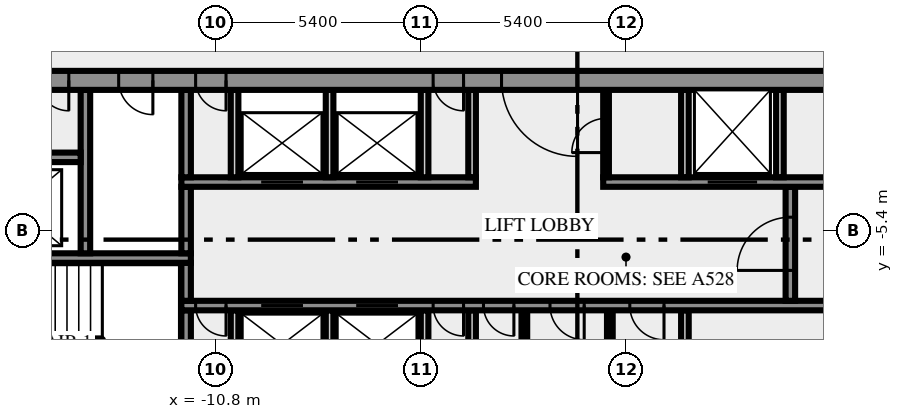
"""IFC4 building model, lengths in metres.
Left out: names, types, materials, properties, quantities, classifications, styles, units other than length and angle.
Written with IfcOpenShell. Run it as: python <this file> out.ifc"""

import sys

from ifc_helpers import new_model, si_unit, direction, frame, frame_2d, origin, place, context, subcontext, project, spatial, rectangle, extrude, element, fill, save


model = new_model("IFC4")
c1 = context("Model", 3, precision=1e-05, world=origin(), true_north=direction((0.0, 1.0)))
c2 = subcontext(c1, "Body", "Model", "MODEL_VIEW")
j1 = project(units=[si_unit("LENGTHUNIT", "METRE"), si_unit("PLANEANGLEUNIT", "RADIAN")], contexts=[c1])
p1 = place(None, origin())
s1 = spatial("IfcSite", under=j1, at=p1, CompositionType="ELEMENT")
p2 = place(p1, origin())
s2 = spatial("IfcBuilding", under=s1, at=p2, CompositionType="ELEMENT")
p3 = place(p2, frame((0.0, 0.0, 351.0)))
s3 = spatial("IfcBuildingStorey", under=s2, at=p3, CompositionType="ELEMENT", Elevation=351.0)
p4 = place(p3, frame((-11.575, -10.5, 0.0), z_axis=(0.0, 0.0, 1.0), x_axis=(0.0, 1.0, 0.0)))
e1 = element("IfcWall", 1, at=p4, inside=s3, PredefinedType="SHEAR", context=c2, shape_type="SweptSolid", body=[
    extrude(rectangle(XDim=3.0, YDim=0.25, at=frame_2d((1.5, 0.0))), origin(), (0.0, 0.0, 1.0), 3.2),
])
for number, where, z_axis, x_axis in (
    (2, (-10.3, -10.5, 0.0), (0.0, 0.0, 1.0), (0.0, 1.0, 0.0)),
    (3, (-7.8, -10.5, 0.0), (0.0, 0.0, 1.0), (0.0, 1.0, 0.0)),
    (4, (-5.3, -10.5, 0.0), (0.0, 0.0, 1.0), (0.0, 1.0, 0.0)),
    (5, (-4.05, -10.5, 0.0), (0.0, 0.0, 1.0), (0.0, 1.0, 0.0)),
):
    element("IfcWall", number, at=place(p3, frame(where, z_axis=z_axis, x_axis=x_axis)), inside=s3, PredefinedType="SOLIDWALL", context=c2, shape_type="SweptSolid", body=[
        extrude(rectangle(XDim=3.0, YDim=0.2, at=frame_2d((1.5, 0.0))), origin(), (0.0, 0.0, 1.0), 3.2),
    ])
for number, where, z_axis, x_axis in (
    (6, (-2.675, -10.5, 0.0), (0.0, 0.0, 1.0), (0.0, 1.0, 0.0)),
    (7, (-0.425, -10.5, 0.0), (0.0, 0.0, 1.0), (0.0, 1.0, 0.0)),
):
    element("IfcWall", number, at=place(p3, frame(where, z_axis=z_axis, x_axis=x_axis)), inside=s3, PredefinedType="PARTITIONING", context=c2, shape_type="SweptSolid", body=[
        extrude(rectangle(XDim=3.0, YDim=0.15, at=frame_2d((1.5, 0.0))), origin(), (0.0, 0.0, 1.0), 3.2),
    ])
p5 = place(p3, frame((1.55, -10.5, 0.0), z_axis=(0.0, 0.0, 1.0), x_axis=(0.0, 1.0, 0.0)))
e8 = element("IfcWall", 8, at=p5, inside=s3, PredefinedType="SOLIDWALL", context=c2, shape_type="SweptSolid", body=[
    extrude(rectangle(XDim=3.0, YDim=0.2, at=frame_2d((1.5, 0.0))), origin(), (0.0, 0.0, 1.0), 3.2),
])
p6 = place(p3, frame((11.7, -7.375, 0.0), z_axis=(0.0, 0.0, 1.0), x_axis=(-1.0, 0.0, 0.0)))
e9 = element("IfcWall", 9, at=p6, inside=s3, PredefinedType="SHEAR", context=c2, shape_type="SweptSolid", body=[
    extrude(rectangle(XDim=23.4, YDim=0.25, at=frame_2d((11.7, 0.0))), origin(), (0.0, 0.0, 1.0), 3.2),
])
p7 = place(p6, frame((22.225, 0.0, 0.0)))
e10 = element("IfcOpeningElement", 10, at=p7, cuts=e9, PredefinedType="OPENING", context=c2, shape_type="SweptSolid", body=[
    extrude(rectangle(XDim=0.8, YDim=2.1, at=frame_2d((0.4, 1.05))), frame((0.0, 0.135, 0.0), z_axis=(0.0, -1.0, 0.0), x_axis=(1.0, 0.0, 0.0)), (0.0, 0.0, 1.0), 0.27),
])
p8 = place(p6, frame((20.2, 0.0, 0.0)))
e11 = element("IfcOpeningElement", 11, at=p8, cuts=e9, PredefinedType="OPENING", context=c2, shape_type="SweptSolid", body=[
    extrude(rectangle(XDim=1.1, YDim=2.1, at=frame_2d((0.55, 1.05))), frame((0.0, 0.135, 0.0), z_axis=(0.0, -1.0, 0.0), x_axis=(1.0, 0.0, 0.0)), (0.0, 0.0, 1.0), 0.27),
])
p9 = place(p6, frame((17.7, 0.0, 0.0)))
e12 = element("IfcOpeningElement", 12, at=p9, cuts=e9, PredefinedType="OPENING", context=c2, shape_type="SweptSolid", body=[
    extrude(rectangle(XDim=1.1, YDim=2.1, at=frame_2d((0.55, 1.05))), frame((0.0, 0.135, 0.0), z_axis=(0.0, -1.0, 0.0), x_axis=(1.0, 0.0, 0.0)), (0.0, 0.0, 1.0), 0.27),
])
p10 = place(p6, frame((15.975, 0.0, 0.0)))
e13 = element("IfcOpeningElement", 13, at=p10, cuts=e9, PredefinedType="OPENING", context=c2, shape_type="SweptSolid", body=[
    extrude(rectangle(XDim=0.8, YDim=2.1, at=frame_2d((0.4, 1.05))), frame((0.0, 0.135, 0.0), z_axis=(0.0, -1.0, 0.0), x_axis=(1.0, 0.0, 0.0)), (0.0, 0.0, 1.0), 0.27),
])
p11 = place(p6, frame((14.65, 0.0, 0.0)))
e14 = element("IfcOpeningElement", 14, at=p11, cuts=e9, PredefinedType="OPENING", context=c2, shape_type="SweptSolid", body=[
    extrude(rectangle(XDim=0.8, YDim=2.1, at=frame_2d((0.4, 1.05))), frame((0.0, 0.135, 0.0), z_axis=(0.0, -1.0, 0.0), x_axis=(1.0, 0.0, 0.0)), (0.0, 0.0, 1.0), 0.27),
])
p12 = place(p6, frame((12.8, 0.0, 0.0)))
e15 = element("IfcOpeningElement", 15, at=p12, cuts=e9, PredefinedType="OPENING", context=c2, shape_type="SweptSolid", body=[
    extrude(rectangle(XDim=0.9, YDim=2.1, at=frame_2d((0.45, 1.05))), frame((0.0, 0.135, 0.0), z_axis=(0.0, -1.0, 0.0), x_axis=(1.0, 0.0, 0.0)), (0.0, 0.0, 1.0), 0.27),
])
p13 = place(p6, frame((10.7, 0.0, 0.0)))
e16 = element("IfcOpeningElement", 16, at=p13, cuts=e9, PredefinedType="OPENING", context=c2, shape_type="SweptSolid", body=[
    extrude(rectangle(XDim=0.9, YDim=2.1, at=frame_2d((0.45, 1.05))), frame((0.0, 0.135, 0.0), z_axis=(0.0, -1.0, 0.0), x_axis=(1.0, 0.0, 0.0)), (0.0, 0.0, 1.0), 0.27),
])
p14 = place(p6, frame((4.7, 0.0, 0.0)))
e17 = element("IfcOpeningElement", 17, at=p14, cuts=e9, PredefinedType="OPENING", context=c2, shape_type="SweptSolid", body=[
    extrude(rectangle(XDim=0.9, YDim=2.1, at=frame_2d((0.45, 1.05))), frame((0.0, 0.135, 0.0), z_axis=(0.0, -1.0, 0.0), x_axis=(1.0, 0.0, 0.0)), (0.0, 0.0, 1.0), 0.27),
])
p15 = place(p3, frame((-11.575, -7.25, 0.0), z_axis=(0.0, 0.0, 1.0), x_axis=(0.0, 1.0, 0.0)))
e18 = element("IfcWall", 18, at=p15, inside=s3, PredefinedType="SHEAR", context=c2, shape_type="SweptSolid", body=[
    extrude(rectangle(XDim=1.0, YDim=0.25, at=frame_2d((0.5, 0.0))), origin(), (0.0, 0.0, 1.0), 3.2),
])
p16 = place(p3, frame((4.325, -7.25, 0.0), z_axis=(0.0, 0.0, 1.0), x_axis=(0.0, 1.0, 0.0)))
e19 = element("IfcWall", 19, at=p16, inside=s3, PredefinedType="SHEAR", context=c2, shape_type="SweptSolid", body=[
    extrude(rectangle(XDim=3.0, YDim=0.25, at=frame_2d((1.5, 0.0))), origin(), (0.0, 0.0, 1.0), 3.2),
])
p17 = place(p16, frame((0.8, 0.0, 0.0)))
e20 = element("IfcOpeningElement", 20, at=p17, cuts=e19, PredefinedType="OPENING", context=c2, shape_type="SweptSolid", body=[
    extrude(rectangle(XDim=1.4, YDim=2.1, at=frame_2d((0.7, 1.05))), frame((0.0, 0.135, 0.0), z_axis=(0.0, -1.0, 0.0), x_axis=(1.0, 0.0, 0.0)), (0.0, 0.0, 1.0), 0.27),
])
p18 = place(p3, frame((-11.45, -6.125, 0.0), z_axis=(0.0, 0.0, 1.0), x_axis=(-1.0, 0.0, 0.0)))
e21 = element("IfcWall", 21, at=p18, inside=s3, PredefinedType="SHEAR", context=c2, shape_type="SweptSolid", body=[
    extrude(rectangle(XDim=8.05, YDim=0.25, at=frame_2d((4.025, 0.0))), origin(), (0.0, 0.0, 1.0), 3.2),
])
p19 = place(p18, frame((6.2, 0.0, 0.0)))
e22 = element("IfcOpeningElement", 22, at=p19, cuts=e21, PredefinedType="OPENING", context=c2, shape_type="SweptSolid", body=[
    extrude(rectangle(XDim=1.8, YDim=2.1, at=frame_2d((0.9, 1.05))), frame((0.0, 0.135, 0.0), z_axis=(0.0, -1.0, 0.0), x_axis=(1.0, 0.0, 0.0)), (0.0, 0.0, 1.0), 0.27),
])
p20 = place(p3, frame((-14.225, -6.0, 0.0), z_axis=(0.0, 0.0, 1.0), x_axis=(0.0, 1.0, 0.0)))
e23 = element("IfcWall", 23, at=p20, inside=s3, PredefinedType="SHEAR", context=c2, shape_type="SweptSolid", body=[
    extrude(rectangle(XDim=4.3, YDim=0.25, at=frame_2d((2.15, 0.0))), origin(), (0.0, 0.0, 1.0), 3.2),
])
p21 = place(p3, frame((-11.575, -6.0, 0.0), z_axis=(0.0, 0.0, 1.0), x_axis=(0.0, 1.0, 0.0)))
e24 = element("IfcWall", 24, at=p21, inside=s3, PredefinedType="SHEAR", context=c2, shape_type="SweptSolid", body=[
    extrude(rectangle(XDim=1.75, YDim=0.25, at=frame_2d((0.875, 0.0))), origin(), (0.0, 0.0, 1.0), 3.2),
])
p22 = place(p3, frame((-11.7, -4.125, 0.0), z_axis=(0.0, 0.0, 1.0), x_axis=(1.0, 0.0, 0.0)))
e25 = element("IfcWall", 25, at=p22, inside=s3, PredefinedType="SHEAR", context=c2, shape_type="SweptSolid", body=[
    extrude(rectangle(XDim=7.75, YDim=0.25, at=frame_2d((3.875, 0.0))), origin(), (0.0, 0.0, 1.0), 3.2),
])
p23 = place(p22, frame((2.1, 0.0, 0.0)))
e26 = element("IfcOpeningElement", 26, at=p23, cuts=e25, PredefinedType="OPENING", context=c2, shape_type="SweptSolid", body=[
    extrude(rectangle(XDim=1.1, YDim=2.1, at=frame_2d((0.55, 1.05))), frame((0.0, 0.135, 0.0), z_axis=(0.0, -1.0, 0.0), x_axis=(1.0, 0.0, 0.0)), (0.0, 0.0, 1.0), 0.27),
])
p24 = place(p22, frame((4.6, 0.0, 0.0)))
e27 = element("IfcOpeningElement", 27, at=p24, cuts=e25, PredefinedType="OPENING", context=c2, shape_type="SweptSolid", body=[
    extrude(rectangle(XDim=1.1, YDim=2.1, at=frame_2d((0.55, 1.05))), frame((0.0, 0.135, 0.0), z_axis=(0.0, -1.0, 0.0), x_axis=(1.0, 0.0, 0.0)), (0.0, 0.0, 1.0), 0.27),
])
p25 = place(p3, frame((-0.6, -4.125, 0.0), z_axis=(0.0, 0.0, 1.0), x_axis=(1.0, 0.0, 0.0)))
e28 = element("IfcWall", 28, at=p25, inside=s3, PredefinedType="SHEAR", context=c2, shape_type="SweptSolid", body=[
    extrude(rectangle(XDim=12.3, YDim=0.25, at=frame_2d((6.15, 0.0))), origin(), (0.0, 0.0, 1.0), 3.2),
])
p26 = place(p25, frame((2.75, 0.0, 0.0)))
e29 = element("IfcOpeningElement", 29, at=p26, cuts=e28, PredefinedType="OPENING", context=c2, shape_type="SweptSolid", body=[
    extrude(rectangle(XDim=1.3, YDim=2.1, at=frame_2d((0.65, 1.05))), frame((0.0, 0.135, 0.0), z_axis=(0.0, -1.0, 0.0), x_axis=(1.0, 0.0, 0.0)), (0.0, 0.0, 1.0), 0.27),
])
p27 = place(p3, frame((-11.575, -4.0, 0.0), z_axis=(0.0, 0.0, 1.0), x_axis=(0.0, 1.0, 0.0)))
e30 = element("IfcWall", 30, at=p27, inside=s3, PredefinedType="SHEAR", context=c2, shape_type="SweptSolid", body=[
    extrude(rectangle(XDim=2.3, YDim=0.25, at=frame_2d((1.15, 0.0))), origin(), (0.0, 0.0, 1.0), 3.2),
])
for number, where, z_axis, x_axis in (
    (31, (-10.3, -4.0, 0.0), (0.0, 0.0, 1.0), (0.0, 1.0, 0.0)),
    (32, (-7.8, -4.0, 0.0), (0.0, 0.0, 1.0), (0.0, 1.0, 0.0)),
    (33, (-5.3, -4.0, 0.0), (0.0, 0.0, 1.0), (0.0, 1.0, 0.0)),
    (34, (-4.05, -4.0, 0.0), (0.0, 0.0, 1.0), (0.0, 1.0, 0.0)),
):
    element("IfcWall", number, at=place(p3, frame(where, z_axis=z_axis, x_axis=x_axis)), inside=s3, PredefinedType="SOLIDWALL", context=c2, shape_type="SweptSolid", body=[
        extrude(rectangle(XDim=2.3, YDim=0.2, at=frame_2d((1.15, 0.0))), origin(), (0.0, 0.0, 1.0), 3.2),
    ])
p28 = place(p3, frame((-0.525, -4.0, 0.0), z_axis=(0.0, 0.0, 1.0), x_axis=(0.0, 1.0, 0.0)))
e35 = element("IfcWall", 35, at=p28, inside=s3, PredefinedType="PARTITIONING", context=c2, shape_type="SweptSolid", body=[
    extrude(rectangle(XDim=2.3, YDim=0.15, at=frame_2d((1.15, 0.0))), origin(), (0.0, 0.0, 1.0), 3.2),
])
p29 = place(p28, frame((0.65, 0.0, 0.0)))
e36 = element("IfcOpeningElement", 36, at=p29, cuts=e35, PredefinedType="OPENING", context=c2, shape_type="SweptSolid", body=[
    extrude(rectangle(XDim=0.9, YDim=2.1, at=frame_2d((0.45, 1.05))), frame((0.0, 0.085, 0.0), z_axis=(0.0, -1.0, 0.0), x_axis=(1.0, 0.0, 0.0)), (0.0, 0.0, 1.0), 0.17),
])
for number, where, z_axis, x_axis in (
    (37, (1.55, -4.0, 0.0), (0.0, 0.0, 1.0), (0.0, 1.0, 0.0)),
    (38, (4.05, -4.0, 0.0), (0.0, 0.0, 1.0), (0.0, 1.0, 0.0)),
):
    element("IfcWall", number, at=place(p3, frame(where, z_axis=z_axis, x_axis=x_axis)), inside=s3, PredefinedType="SOLIDWALL", context=c2, shape_type="SweptSolid", body=[
        extrude(rectangle(XDim=2.3, YDim=0.2, at=frame_2d((1.15, 0.0))), origin(), (0.0, 0.0, 1.0), 3.2),
    ])
p30 = place(p3, frame((-17.35, -3.475, 0.0), z_axis=(0.0, 0.0, 1.0), x_axis=(1.0, 0.0, 0.0)))
e39 = element("IfcWall", 39, at=p30, inside=s3, PredefinedType="SHEAR", context=c2, shape_type="SweptSolid", body=[
    extrude(rectangle(XDim=3.0, YDim=0.25, at=frame_2d((1.5, 0.0))), origin(), (0.0, 0.0, 1.0), 3.2),
])
p31 = place(p3, frame((20.49, -1.45, 0.0), z_axis=(0.0, 0.0, 1.0), x_axis=(-1.0, 0.0, 0.0)))
e40 = element("IfcWall", 40, at=p31, inside=s3, PredefinedType="SHEAR", context=c2, shape_type="SweptSolid", body=[
    extrude(rectangle(XDim=40.98, YDim=0.5, at=frame_2d((20.49, 0.0))), origin(), (0.0, 0.0, 1.0), 3.2),
])
p32 = place(p31, frame((38.14, 0.0, 0.0)))
e41 = element("IfcOpeningElement", 41, at=p32, cuts=e40, PredefinedType="OPENING", context=c2, shape_type="SweptSolid", body=[
    extrude(rectangle(XDim=1.8, YDim=2.1, at=frame_2d((0.9, 1.05))), frame((0.0, 0.26, 0.0), z_axis=(0.0, -1.0, 0.0), x_axis=(1.0, 0.0, 0.0)), (0.0, 0.0, 1.0), 0.52),
])
p33 = place(p31, frame((36.728, 0.0, 0.0)))
e42 = element("IfcOpeningElement", 42, at=p33, cuts=e40, PredefinedType="OPENING", context=c2, shape_type="SweptSolid", body=[
    extrude(rectangle(XDim=0.8, YDim=2.1, at=frame_2d((0.4, 1.05))), frame((0.0, 0.26, 0.0), z_axis=(0.0, -1.0, 0.0), x_axis=(1.0, 0.0, 0.0)), (0.0, 0.0, 1.0), 0.52),
])
p34 = place(p31, frame((35.153, 0.0, 0.0)))
e43 = element("IfcOpeningElement", 43, at=p34, cuts=e40, PredefinedType="OPENING", context=c2, shape_type="SweptSolid", body=[
    extrude(rectangle(XDim=0.8, YDim=2.1, at=frame_2d((0.4, 1.05))), frame((0.0, 0.26, 0.0), z_axis=(0.0, -1.0, 0.0), x_axis=(1.0, 0.0, 0.0)), (0.0, 0.0, 1.0), 0.52),
])
p35 = place(p31, frame((32.94, 0.0, 0.0)))
e44 = element("IfcOpeningElement", 44, at=p35, cuts=e40, PredefinedType="OPENING", context=c2, shape_type="SweptSolid", body=[
    extrude(rectangle(XDim=0.9, YDim=2.1, at=frame_2d((0.45, 1.05))), frame((0.0, 0.26, 0.0), z_axis=(0.0, -1.0, 0.0), x_axis=(1.0, 0.0, 0.0)), (0.0, 0.0, 1.0), 0.52),
])
p36 = place(p31, frame((31.015, 0.0, 0.0)))
e45 = element("IfcOpeningElement", 45, at=p36, cuts=e40, PredefinedType="OPENING", context=c2, shape_type="SweptSolid", body=[
    extrude(rectangle(XDim=0.8, YDim=2.1, at=frame_2d((0.4, 1.05))), frame((0.0, 0.26, 0.0), z_axis=(0.0, -1.0, 0.0), x_axis=(1.0, 0.0, 0.0)), (0.0, 0.0, 1.0), 0.52),
])
p37 = place(p31, frame((24.765, 0.0, 0.0)))
e46 = element("IfcOpeningElement", 46, at=p37, cuts=e40, PredefinedType="OPENING", context=c2, shape_type="SweptSolid", body=[
    extrude(rectangle(XDim=0.8, YDim=2.1, at=frame_2d((0.4, 1.05))), frame((0.0, 0.26, 0.0), z_axis=(0.0, -1.0, 0.0), x_axis=(1.0, 0.0, 0.0)), (0.0, 0.0, 1.0), 0.52),
])
p38 = place(p31, frame((21.765, 0.0, 0.0)))
e47 = element("IfcOpeningElement", 47, at=p38, cuts=e40, PredefinedType="OPENING", context=c2, shape_type="SweptSolid", body=[
    extrude(rectangle(XDim=2.0, YDim=2.1, at=frame_2d((1.0, 1.05))), frame((0.0, 0.26, 0.0), z_axis=(0.0, -1.0, 0.0), x_axis=(1.0, 0.0, 0.0)), (0.0, 0.0, 1.0), 0.52),
])
p39 = place(p31, frame((14.002, 0.0, 0.0)))
e48 = element("IfcOpeningElement", 48, at=p39, cuts=e40, PredefinedType="OPENING", context=c2, shape_type="SweptSolid", body=[
    extrude(rectangle(XDim=0.9, YDim=2.1, at=frame_2d((0.45, 1.05))), frame((0.0, 0.26, 0.0), z_axis=(0.0, -1.0, 0.0), x_axis=(1.0, 0.0, 0.0)), (0.0, 0.0, 1.0), 0.52),
])
p40 = place(p31, frame((10.278, 0.0, 0.0)))
e49 = element("IfcOpeningElement", 49, at=p40, cuts=e40, PredefinedType="OPENING", context=c2, shape_type="SweptSolid", body=[
    extrude(rectangle(XDim=0.9, YDim=2.1, at=frame_2d((0.45, 1.05))), frame((0.0, 0.26, 0.0), z_axis=(0.0, -1.0, 0.0), x_axis=(1.0, 0.0, 0.0)), (0.0, 0.0, 1.0), 0.52),
])
p41 = place(p31, frame((7.14, 0.0, 0.0)))
e50 = element("IfcOpeningElement", 50, at=p41, cuts=e40, PredefinedType="OPENING", context=c2, shape_type="SweptSolid", body=[
    extrude(rectangle(XDim=0.9, YDim=2.1, at=frame_2d((0.45, 1.05))), frame((0.0, 0.26, 0.0), z_axis=(0.0, -1.0, 0.0), x_axis=(1.0, 0.0, 0.0)), (0.0, 0.0, 1.0), 0.52),
])
p42 = place(p31, frame((4.19, 0.0, 0.0)))
e51 = element("IfcOpeningElement", 51, at=p42, cuts=e40, PredefinedType="OPENING", context=c2, shape_type="SweptSolid", body=[
    extrude(rectangle(XDim=0.9, YDim=2.1, at=frame_2d((0.45, 1.05))), frame((0.0, 0.26, 0.0), z_axis=(0.0, -1.0, 0.0), x_axis=(1.0, 0.0, 0.0)), (0.0, 0.0, 1.0), 0.52),
])
p43 = place(p31, frame((1.04, 0.0, 0.0)))
e52 = element("IfcOpeningElement", 52, at=p43, cuts=e40, PredefinedType="OPENING", context=c2, shape_type="SweptSolid", body=[
    extrude(rectangle(XDim=1.8, YDim=2.1, at=frame_2d((0.9, 1.05))), frame((0.0, 0.26, 0.0), z_axis=(0.0, -1.0, 0.0), x_axis=(1.0, 0.0, 0.0)), (0.0, 0.0, 1.0), 0.52),
])
p44 = place(p7, origin())
e53 = element("IfcDoor", 53, at=p44, inside=s3, OperationType="SINGLE_SWING_RIGHT", PredefinedType="DOOR", context=c2, shape_type="SweptSolid", body=[
    extrude(rectangle(XDim=0.8, YDim=2.1, at=frame_2d((0.4, 1.05))), frame((0.0, 0.025, 0.0), z_axis=(0.0, -1.0, 0.0), x_axis=(1.0, 0.0, 0.0)), (0.0, 0.0, 1.0), 0.05),
])
fill(e10, e53)
p45 = place(p8, origin())
e54 = element("IfcDoor", 54, at=p45, inside=s3, OperationType="DOUBLE_DOOR_SLIDING", PredefinedType="DOOR", context=c2, shape_type="SweptSolid", body=[
    extrude(rectangle(XDim=1.1, YDim=2.1, at=frame_2d((0.55, 1.05))), frame((0.0, 0.025, 0.0), z_axis=(0.0, -1.0, 0.0), x_axis=(1.0, 0.0, 0.0)), (0.0, 0.0, 1.0), 0.05),
])
fill(e11, e54)
p46 = place(p9, origin())
e55 = element("IfcDoor", 55, at=p46, inside=s3, OperationType="DOUBLE_DOOR_SLIDING", PredefinedType="DOOR", context=c2, shape_type="SweptSolid", body=[
    extrude(rectangle(XDim=1.1, YDim=2.1, at=frame_2d((0.55, 1.05))), frame((0.0, 0.025, 0.0), z_axis=(0.0, -1.0, 0.0), x_axis=(1.0, 0.0, 0.0)), (0.0, 0.0, 1.0), 0.05),
])
fill(e12, e55)
p47 = place(p10, origin())
e56 = element("IfcDoor", 56, at=p47, inside=s3, OperationType="SINGLE_SWING_RIGHT", PredefinedType="DOOR", context=c2, shape_type="SweptSolid", body=[
    extrude(rectangle(XDim=0.8, YDim=2.1, at=frame_2d((0.4, 1.05))), frame((0.0, 0.025, 0.0), z_axis=(0.0, -1.0, 0.0), x_axis=(1.0, 0.0, 0.0)), (0.0, 0.0, 1.0), 0.05),
])
fill(e13, e56)
p48 = place(p11, origin())
e57 = element("IfcDoor", 57, at=p48, inside=s3, OperationType="SINGLE_SWING_RIGHT", PredefinedType="DOOR", context=c2, shape_type="SweptSolid", body=[
    extrude(rectangle(XDim=0.8, YDim=2.1, at=frame_2d((0.4, 1.05))), frame((0.0, 0.025, 0.0), z_axis=(0.0, -1.0, 0.0), x_axis=(1.0, 0.0, 0.0)), (0.0, 0.0, 1.0), 0.05),
])
fill(e14, e57)
p49 = place(p12, origin())
e58 = element("IfcDoor", 58, at=p49, inside=s3, OperationType="SINGLE_SWING_RIGHT", PredefinedType="DOOR", context=c2, shape_type="SweptSolid", body=[
    extrude(rectangle(XDim=0.9, YDim=2.1, at=frame_2d((0.45, 1.05))), frame((0.0, 0.025, 0.0), z_axis=(0.0, -1.0, 0.0), x_axis=(1.0, 0.0, 0.0)), (0.0, 0.0, 1.0), 0.05),
])
fill(e15, e58)
p50 = place(p13, origin())
e59 = element("IfcDoor", 59, at=p50, inside=s3, OperationType="SINGLE_SWING_LEFT", PredefinedType="DOOR", context=c2, shape_type="SweptSolid", body=[
    extrude(rectangle(XDim=0.9, YDim=2.1, at=frame_2d((0.45, 1.05))), frame((0.0, 0.025, 0.0), z_axis=(0.0, -1.0, 0.0), x_axis=(1.0, 0.0, 0.0)), (0.0, 0.0, 1.0), 0.05),
])
fill(e16, e59)
p51 = place(p17, origin())
e60 = element("IfcDoor", 60, at=p51, inside=s3, OperationType="DOUBLE_DOOR_SINGLE_SWING", PredefinedType="DOOR", context=c2, shape_type="SweptSolid", body=[
    extrude(rectangle(XDim=1.4, YDim=2.1, at=frame_2d((0.7, 1.05))), frame((0.0, 0.025, 0.0), z_axis=(0.0, -1.0, 0.0), x_axis=(1.0, 0.0, 0.0)), (0.0, 0.0, 1.0), 0.05),
])
fill(e20, e60)
p52 = place(p23, origin())
e61 = element("IfcDoor", 61, at=p52, inside=s3, OperationType="DOUBLE_DOOR_SLIDING", PredefinedType="DOOR", context=c2, shape_type="SweptSolid", body=[
    extrude(rectangle(XDim=1.1, YDim=2.1, at=frame_2d((0.55, 1.05))), frame((0.0, 0.025, 0.0), z_axis=(0.0, -1.0, 0.0), x_axis=(1.0, 0.0, 0.0)), (0.0, 0.0, 1.0), 0.05),
])
fill(e26, e61)
p53 = place(p24, origin())
e62 = element("IfcDoor", 62, at=p53, inside=s3, OperationType="DOUBLE_DOOR_SLIDING", PredefinedType="DOOR", context=c2, shape_type="SweptSolid", body=[
    extrude(rectangle(XDim=1.1, YDim=2.1, at=frame_2d((0.55, 1.05))), frame((0.0, 0.025, 0.0), z_axis=(0.0, -1.0, 0.0), x_axis=(1.0, 0.0, 0.0)), (0.0, 0.0, 1.0), 0.05),
])
fill(e27, e62)
p54 = place(p26, origin())
e63 = element("IfcDoor", 63, at=p54, inside=s3, OperationType="DOUBLE_DOOR_SLIDING", PredefinedType="DOOR", context=c2, shape_type="SweptSolid", body=[
    extrude(rectangle(XDim=1.3, YDim=2.1, at=frame_2d((0.65, 1.05))), frame((0.0, 0.025, 0.0), z_axis=(0.0, -1.0, 0.0), x_axis=(1.0, 0.0, 0.0)), (0.0, 0.0, 1.0), 0.05),
])
fill(e29, e63)
p55 = place(p29, origin())
e64 = element("IfcDoor", 64, at=p55, inside=s3, OperationType="SINGLE_SWING_LEFT", PredefinedType="DOOR", context=c2, shape_type="SweptSolid", body=[
    extrude(rectangle(XDim=0.9, YDim=2.1, at=frame_2d((0.45, 1.05))), frame((0.0, 0.025, 0.0), z_axis=(0.0, -1.0, 0.0), x_axis=(1.0, 0.0, 0.0)), (0.0, 0.0, 1.0), 0.05),
])
fill(e36, e64)
p56 = place(p34, origin())
e65 = element("IfcDoor", 65, at=p56, inside=s3, OperationType="SINGLE_SWING_RIGHT", PredefinedType="DOOR", context=c2, shape_type="SweptSolid", body=[
    extrude(rectangle(XDim=0.8, YDim=2.1, at=frame_2d((0.4, 1.05))), frame((0.0, 0.025, 0.0), z_axis=(0.0, -1.0, 0.0), x_axis=(1.0, 0.0, 0.0)), (0.0, 0.0, 1.0), 0.05),
])
fill(e43, e65)
p57 = place(p35, origin())
e66 = element("IfcDoor", 66, at=p57, inside=s3, OperationType="SINGLE_SWING_RIGHT", PredefinedType="DOOR", context=c2, shape_type="SweptSolid", body=[
    extrude(rectangle(XDim=0.9, YDim=2.1, at=frame_2d((0.45, 1.05))), frame((0.0, 0.025, 0.0), z_axis=(0.0, -1.0, 0.0), x_axis=(1.0, 0.0, 0.0)), (0.0, 0.0, 1.0), 0.05),
])
fill(e44, e66)
p58 = place(p36, origin())
e67 = element("IfcDoor", 67, at=p58, inside=s3, OperationType="SINGLE_SWING_RIGHT", PredefinedType="DOOR", context=c2, shape_type="SweptSolid", body=[
    extrude(rectangle(XDim=0.8, YDim=2.1, at=frame_2d((0.4, 1.05))), frame((0.0, 0.025, 0.0), z_axis=(0.0, -1.0, 0.0), x_axis=(1.0, 0.0, 0.0)), (0.0, 0.0, 1.0), 0.05),
])
fill(e45, e67)
p59 = place(p37, origin())
e68 = element("IfcDoor", 68, at=p59, inside=s3, OperationType="SINGLE_SWING_RIGHT", PredefinedType="DOOR", context=c2, shape_type="SweptSolid", body=[
    extrude(rectangle(XDim=0.8, YDim=2.1, at=frame_2d((0.4, 1.05))), frame((0.0, 0.025, 0.0), z_axis=(0.0, -1.0, 0.0), x_axis=(1.0, 0.0, 0.0)), (0.0, 0.0, 1.0), 0.05),
])
fill(e46, e68)
p60 = place(p38, origin())
e69 = element("IfcDoor", 69, at=p60, inside=s3, OperationType="DOUBLE_DOOR_SINGLE_SWING", PredefinedType="DOOR", context=c2, shape_type="SweptSolid", body=[
    extrude(rectangle(XDim=2.0, YDim=2.1, at=frame_2d((1.0, 1.05))), frame((0.0, 0.025, 0.0), z_axis=(0.0, -1.0, 0.0), x_axis=(1.0, 0.0, 0.0)), (0.0, 0.0, 1.0), 0.05),
])
fill(e47, e69)
save(model, sys.argv[1])
